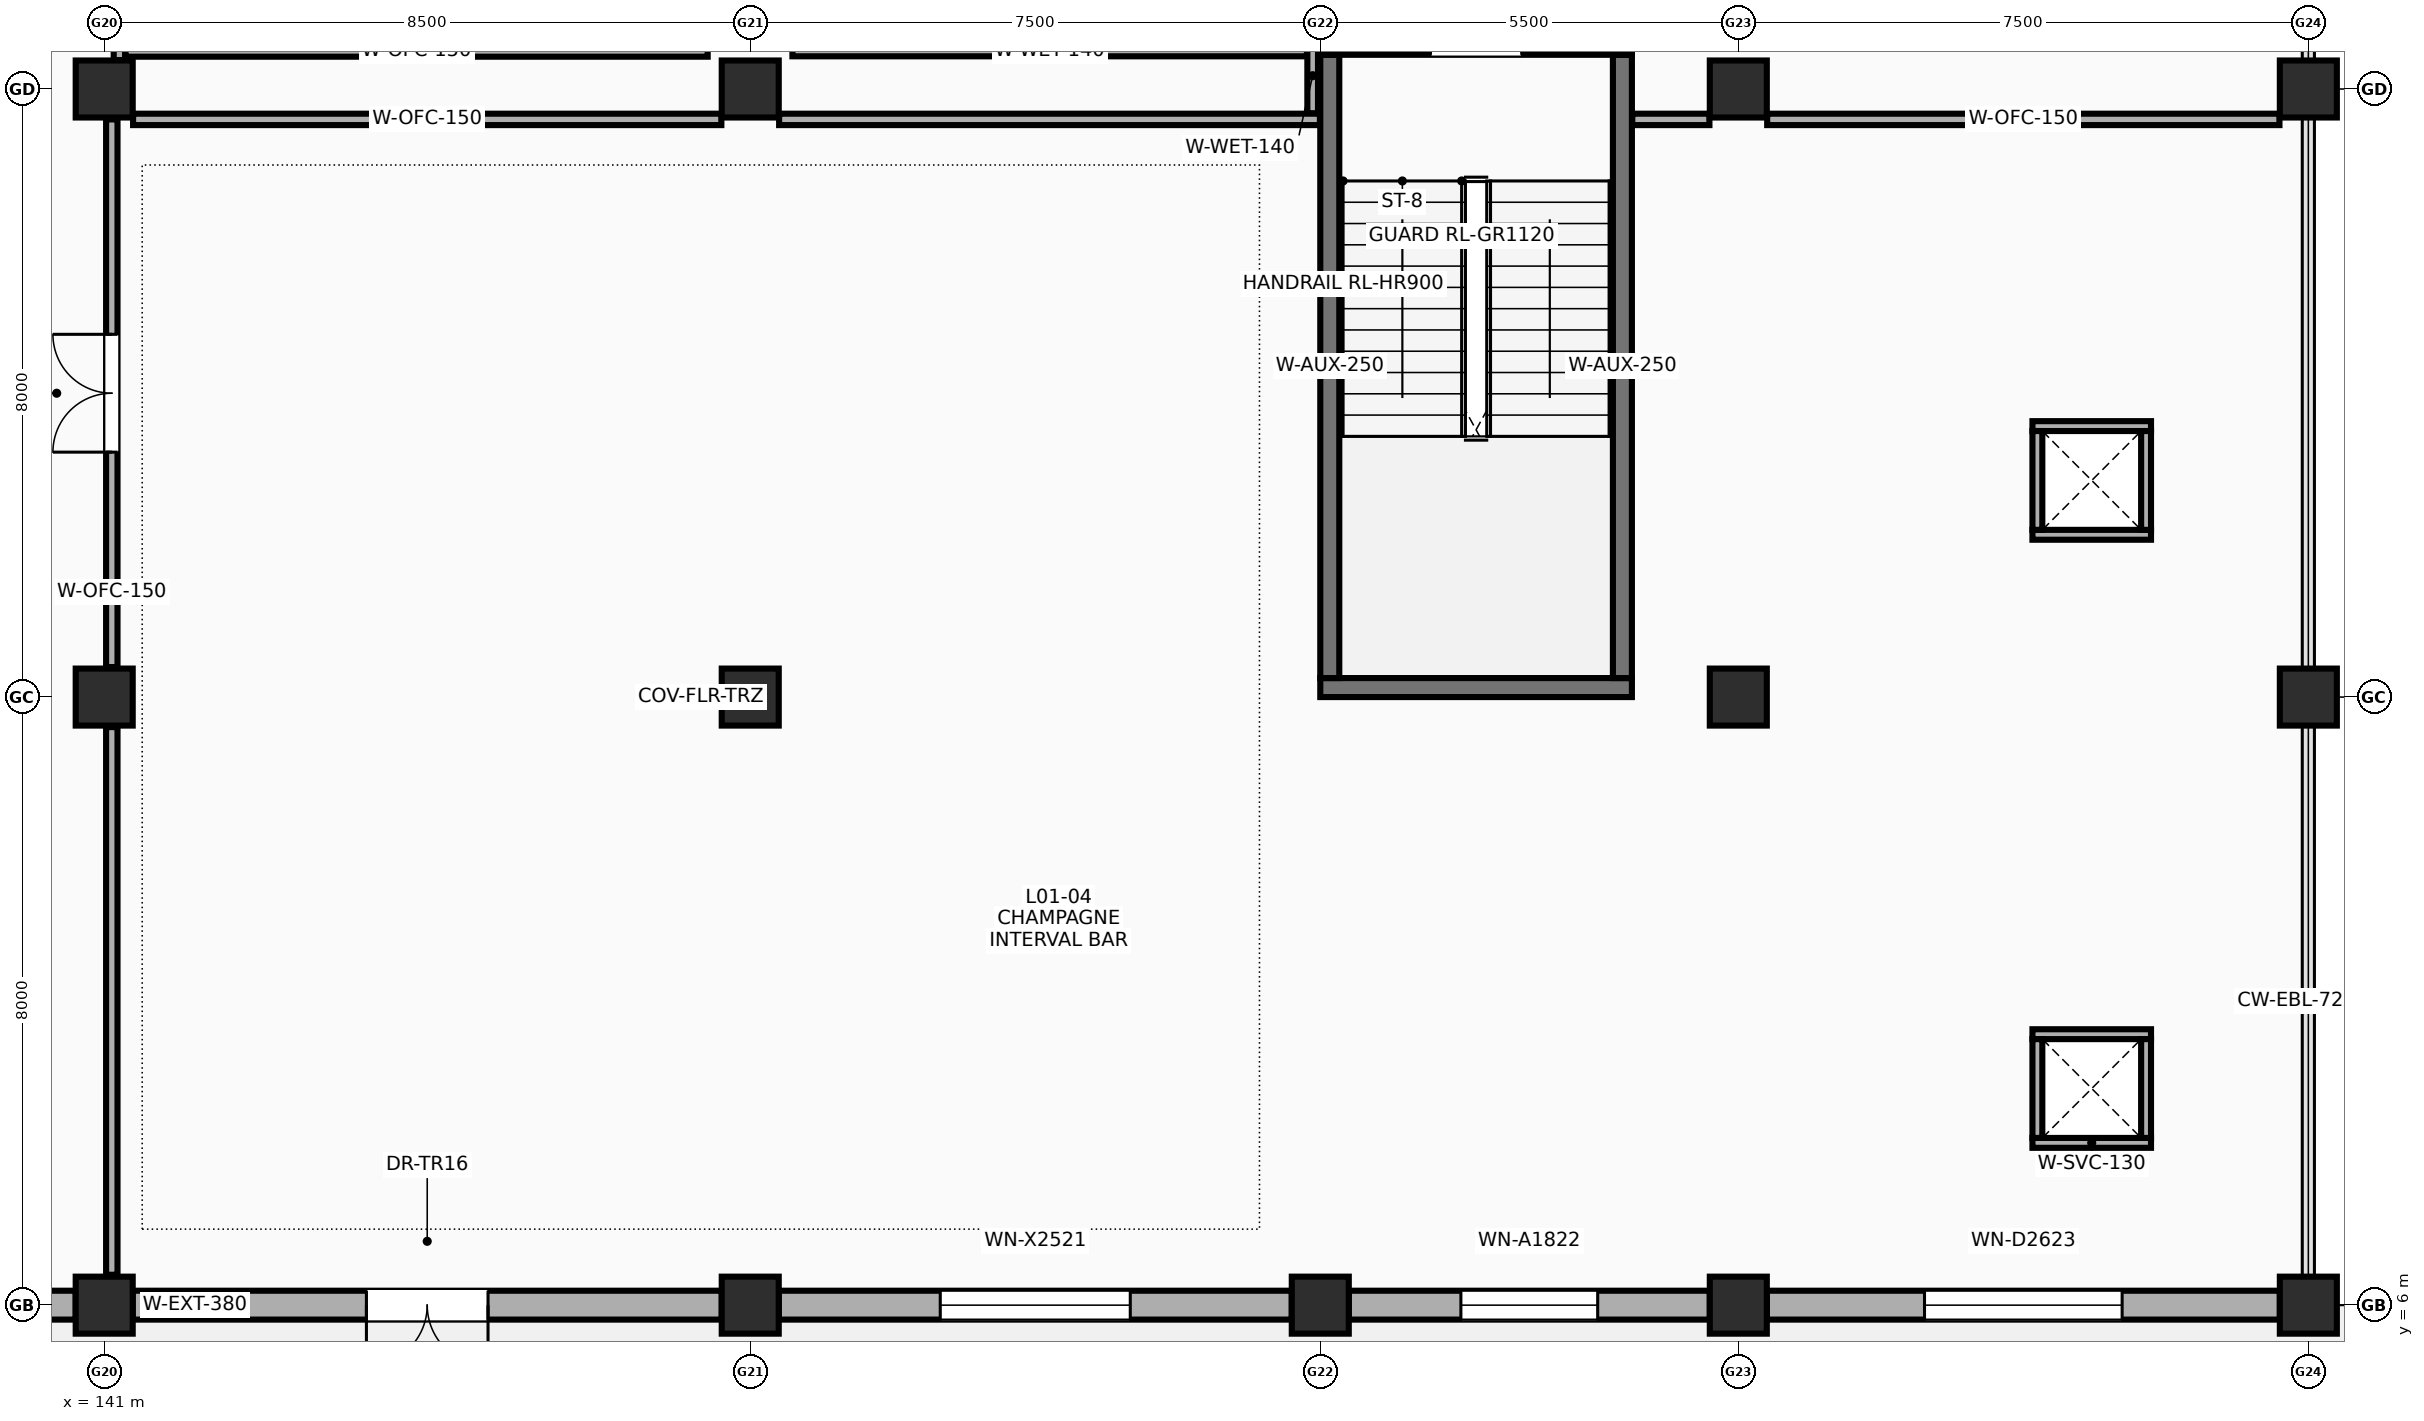
"""IFC4 building model, lengths in metres.
Left out: names, types, materials, properties, quantities, classifications, styles, units other than length and angle.
Written with IfcOpenShell. Run it as: python <this file> out.ifc"""

import sys

from ifc_helpers import new_model, si_unit, direction, frame, frame_2d, origin, origin_2d, place, context, subcontext, project, spatial, rectangle, extrude, element, fill, save


model = new_model("IFC4")
c1 = context("Model", 3, precision=1e-05, world=origin(), true_north=direction((0.0, 1.0)))
c2 = subcontext(c1, "Body", "Model", "MODEL_VIEW")
j1 = project(units=[si_unit("LENGTHUNIT", "METRE"), si_unit("PLANEANGLEUNIT", "RADIAN")], contexts=[c1])
p1 = place(None, origin())
s1 = spatial("IfcSite", under=j1, at=p1, CompositionType="ELEMENT")
p2 = place(p1, origin())
s2 = spatial("IfcBuilding", under=s1, at=p2, CompositionType="ELEMENT")
p3 = place(p2, frame((0.0, 0.0, 5.4)))
s3 = spatial("IfcBuildingStorey", under=s2, at=p3, CompositionType="ELEMENT", Elevation=5.4)
for number, where, z_axis, x_axis in (
    (1, (141.0, 6.0, 0.0), (0.0, 0.0, 1.0), (1.0, 0.0, 0.0)),
    (2, (141.0, 14.0, 0.0), (0.0, 0.0, 1.0), (1.0, 0.0, 0.0)),
    (3, (141.0, 22.0, 0.0), (0.0, 0.0, 1.0), (1.0, 0.0, 0.0)),
    (4, (149.5, 6.0, 0.0), (0.0, 0.0, 1.0), (1.0, 0.0, 0.0)),
    (5, (149.5, 14.0, 0.0), (0.0, 0.0, 1.0), (1.0, 0.0, 0.0)),
    (6, (149.5, 22.0, 0.0), (0.0, 0.0, 1.0), (1.0, 0.0, 0.0)),
    (7, (157.0, 6.0, 0.0), (0.0, 0.0, 1.0), (1.0, 0.0, 0.0)),
    (8, (162.5, 6.0, 0.0), (0.0, 0.0, 1.0), (1.0, 0.0, 0.0)),
    (9, (162.5, 14.0, 0.0), (0.0, 0.0, 1.0), (1.0, 0.0, 0.0)),
    (10, (162.5, 22.0, 0.0), (0.0, 0.0, 1.0), (1.0, 0.0, 0.0)),
    (11, (170.0, 6.0, 0.0), (0.0, 0.0, 1.0), (1.0, 0.0, 0.0)),
    (12, (170.0, 14.0, 0.0), (0.0, 0.0, 1.0), (1.0, 0.0, 0.0)),
    (13, (170.0, 22.0, 0.0), (0.0, 0.0, 1.0), (1.0, 0.0, 0.0)),
):
    element("IfcColumn", number, at=place(p3, frame(where, z_axis=z_axis, x_axis=x_axis)), inside=s3, PredefinedType="COLUMN", context=c2, shape_type="SweptSolid", body=[
        extrude(rectangle(XDim=0.75, YDim=0.75, at=origin_2d()), origin(), (0.0, 0.0, 1.0), 4.4),
    ])
p4 = place(p3, frame((133.375, 6.0, 0.0), z_axis=(0.0, 0.0, 1.0), x_axis=(1.0, 0.0, 0.0)))
e14 = element("IfcWall", 14, at=p4, inside=s3, PredefinedType="SOLIDWALL", context=c2, shape_type="SweptSolid", body=[
    extrude(rectangle(XDim=7.25, YDim=0.38, at=frame_2d((3.625, 0.0))), origin(), (0.0, 0.0, 1.0), 3.2),
])
p5 = place(p4, frame((2.425, 0.0, 0.85)))
e15 = element("IfcOpeningElement", 15, at=p5, cuts=e14, PredefinedType="OPENING", context=c2, shape_type="SweptSolid", body=[
    extrude(rectangle(XDim=2.5, YDim=2.1, at=frame_2d((1.25, 1.05))), frame((0.0, 0.2, 0.0), z_axis=(0.0, -1.0, 0.0), x_axis=(1.0, 0.0, 0.0)), (0.0, 0.0, 1.0), 0.4),
])
p6 = place(p3, frame((141.375, 6.0, 0.0), z_axis=(0.0, 0.0, 1.0), x_axis=(1.0, 0.0, 0.0)))
e16 = element("IfcWall", 16, at=p6, inside=s3, PredefinedType="SOLIDWALL", context=c2, shape_type="SweptSolid", body=[
    extrude(rectangle(XDim=7.75, YDim=0.38, at=frame_2d((3.875, 0.0))), origin(), (0.0, 0.0, 1.0), 3.2),
])
p7 = place(p6, frame((4.675, 0.0, 0.0), z_axis=(0.0, 0.0, 1.0), x_axis=(-1.0, 0.0, 0.0)))
e17 = element("IfcOpeningElement", 17, at=p7, cuts=e16, PredefinedType="OPENING", context=c2, shape_type="SweptSolid", body=[
    extrude(rectangle(XDim=1.6, YDim=2.3, at=frame_2d((0.8, 1.15))), frame((0.0, 0.2, 0.0), z_axis=(0.0, -1.0, 0.0), x_axis=(1.0, 0.0, 0.0)), (0.0, 0.0, 1.0), 0.4),
])
p8 = place(p3, frame((149.875, 6.0, 0.0), z_axis=(0.0, 0.0, 1.0), x_axis=(1.0, 0.0, 0.0)))
e18 = element("IfcWall", 18, at=p8, inside=s3, PredefinedType="SOLIDWALL", context=c2, shape_type="SweptSolid", body=[
    extrude(rectangle(XDim=6.75, YDim=0.38, at=frame_2d((3.375, 0.0))), origin(), (0.0, 0.0, 1.0), 3.2),
])
p9 = place(p8, frame((2.125, 0.0, 0.85)))
e19 = element("IfcOpeningElement", 19, at=p9, cuts=e18, PredefinedType="OPENING", context=c2, shape_type="SweptSolid", body=[
    extrude(rectangle(XDim=2.5, YDim=2.1, at=frame_2d((1.25, 1.05))), frame((0.0, 0.2, 0.0), z_axis=(0.0, -1.0, 0.0), x_axis=(1.0, 0.0, 0.0)), (0.0, 0.0, 1.0), 0.4),
])
p10 = place(p3, frame((157.375, 6.0, 0.0), z_axis=(0.0, 0.0, 1.0), x_axis=(1.0, 0.0, 0.0)))
e20 = element("IfcWall", 20, at=p10, inside=s3, PredefinedType="SOLIDWALL", context=c2, shape_type="SweptSolid", body=[
    extrude(rectangle(XDim=4.75, YDim=0.38, at=frame_2d((2.375, 0.0))), origin(), (0.0, 0.0, 1.0), 3.2),
])
p11 = place(p10, frame((1.475, 0.0, 0.82)))
e21 = element("IfcOpeningElement", 21, at=p11, cuts=e20, PredefinedType="OPENING", context=c2, shape_type="SweptSolid", body=[
    extrude(rectangle(XDim=1.8, YDim=2.2, at=frame_2d((0.9, 1.1))), frame((0.0, 0.2, 0.0), z_axis=(0.0, -1.0, 0.0), x_axis=(1.0, 0.0, 0.0)), (0.0, 0.0, 1.0), 0.4),
])
p12 = place(p3, frame((162.875, 6.0, 0.0), z_axis=(0.0, 0.0, 1.0), x_axis=(1.0, 0.0, 0.0)))
e22 = element("IfcWall", 22, at=p12, inside=s3, PredefinedType="SOLIDWALL", context=c2, shape_type="SweptSolid", body=[
    extrude(rectangle(XDim=6.75, YDim=0.38, at=frame_2d((3.375, 0.0))), origin(), (0.0, 0.0, 1.0), 3.2),
])
p13 = place(p12, frame((2.075, 0.0, 0.72)))
e23 = element("IfcOpeningElement", 23, at=p13, cuts=e22, PredefinedType="OPENING", context=c2, shape_type="SweptSolid", body=[
    extrude(rectangle(XDim=2.6, YDim=2.3, at=frame_2d((1.3, 1.15))), frame((0.0, 0.2, 0.0), z_axis=(0.0, -1.0, 0.0), x_axis=(1.0, 0.0, 0.0)), (0.0, 0.0, 1.0), 0.4),
])
p14 = place(p3, frame((157.0, 14.125, 0.0), z_axis=(0.0, 0.0, 1.0), x_axis=(1.0, 0.0, 0.0)))
e24 = element("IfcWall", 24, at=p14, inside=s3, PredefinedType="SHEAR", context=c2, shape_type="SweptSolid", body=[
    extrude(rectangle(XDim=4.1, YDim=0.25, at=frame_2d((2.05, 0.0))), origin(), (0.0, 0.0, 1.0), 4.4),
])
for number, where, z_axis, x_axis in (
    (25, (157.125, 14.25, 0.0), (0.0, 0.0, 1.0), (0.0, 1.0, 0.0)),
    (26, (160.975, 14.25, 0.0), (0.0, 0.0, 1.0), (0.0, 1.0, 0.0)),
):
    element("IfcWall", number, at=place(p3, frame(where, z_axis=z_axis, x_axis=x_axis)), inside=s3, PredefinedType="SHEAR", context=c2, shape_type="SweptSolid", body=[
        extrude(rectangle(XDim=8.2, YDim=0.25, at=frame_2d((4.1, 0.0))), origin(), (0.0, 0.0, 1.0), 4.4),
    ])
p15 = place(p3, frame((157.0, 22.575, 0.0), z_axis=(0.0, 0.0, 1.0), x_axis=(1.0, 0.0, 0.0)))
e27 = element("IfcWall", 27, at=p15, inside=s3, PredefinedType="SHEAR", context=c2, shape_type="SweptSolid", body=[
    extrude(rectangle(XDim=4.1, YDim=0.25, at=frame_2d((2.05, 0.0))), origin(), (0.0, 0.0, 1.0), 4.4),
])
p16 = place(p15, frame((1.45, 0.0, 0.0)))
e28 = element("IfcOpeningElement", 28, at=p16, cuts=e27, PredefinedType="OPENING", context=c2, shape_type="SweptSolid", body=[
    extrude(rectangle(XDim=1.2, YDim=2.15, at=frame_2d((0.6, 1.075))), frame((0.0, 0.135, 0.0), z_axis=(0.0, -1.0, 0.0), x_axis=(1.0, 0.0, 0.0)), (0.0, 0.0, 1.0), 0.27),
])
for number, where, z_axis, x_axis in (
    (29, (166.37, 8.135, 0.0), (0.0, 0.0, 1.0), (1.0, 0.0, 0.0)),
    (30, (166.37, 9.565, 0.0), (0.0, 0.0, 1.0), (1.0, 0.0, 0.0)),
):
    element("IfcWall", number, at=place(p3, frame(where, z_axis=z_axis, x_axis=x_axis)), inside=s3, PredefinedType="PARTITIONING", context=c2, shape_type="SweptSolid", body=[
        extrude(rectangle(XDim=1.56, YDim=0.13, at=frame_2d((0.78, 0.0))), origin(), (0.0, 0.0, 1.0), 4.02),
    ])
for number, where, z_axis, x_axis in (
    (31, (166.435, 8.2, 0.0), (0.0, 0.0, 1.0), (0.0, 1.0, 0.0)),
    (32, (167.865, 8.2, 0.0), (0.0, 0.0, 1.0), (0.0, 1.0, 0.0)),
):
    element("IfcWall", number, at=place(p3, frame(where, z_axis=z_axis, x_axis=x_axis)), inside=s3, PredefinedType="PARTITIONING", context=c2, shape_type="SweptSolid", body=[
        extrude(rectangle(XDim=1.3, YDim=0.13, at=frame_2d((0.65, 0.0))), origin(), (0.0, 0.0, 1.0), 4.02),
    ])
for number, where, z_axis, x_axis in (
    (33, (166.37, 16.135, 0.0), (0.0, 0.0, 1.0), (1.0, 0.0, 0.0)),
    (34, (166.37, 17.565, 0.0), (0.0, 0.0, 1.0), (1.0, 0.0, 0.0)),
):
    element("IfcWall", number, at=place(p3, frame(where, z_axis=z_axis, x_axis=x_axis)), inside=s3, PredefinedType="PARTITIONING", context=c2, shape_type="SweptSolid", body=[
        extrude(rectangle(XDim=1.56, YDim=0.13, at=frame_2d((0.78, 0.0))), origin(), (0.0, 0.0, 1.0), 4.02),
    ])
for number, where, z_axis, x_axis in (
    (35, (166.435, 16.2, 0.0), (0.0, 0.0, 1.0), (0.0, 1.0, 0.0)),
    (36, (167.865, 16.2, 0.0), (0.0, 0.0, 1.0), (0.0, 1.0, 0.0)),
):
    element("IfcWall", number, at=place(p3, frame(where, z_axis=z_axis, x_axis=x_axis)), inside=s3, PredefinedType="PARTITIONING", context=c2, shape_type="SweptSolid", body=[
        extrude(rectangle(XDim=1.3, YDim=0.13, at=frame_2d((0.65, 0.0))), origin(), (0.0, 0.0, 1.0), 4.02),
    ])
p17 = place(p3, frame((141.1, 14.395, 0.0), z_axis=(0.0, 0.0, 1.0), x_axis=(0.0, 1.0, 0.0)))
e37 = element("IfcWall", 37, at=p17, inside=s3, PredefinedType="PARTITIONING", context=c2, shape_type="SweptSolid", body=[
    extrude(rectangle(XDim=7.205, YDim=0.15, at=frame_2d((3.603, 0.0))), origin(), (0.0, 0.0, 1.0), 3.3),
])
p18 = place(p17, frame((2.827, 0.0, 0.0)))
e38 = element("IfcOpeningElement", 38, at=p18, cuts=e37, PredefinedType="OPENING", context=c2, shape_type="SweptSolid", body=[
    extrude(rectangle(XDim=1.55, YDim=2.25, at=frame_2d((0.775, 1.125))), frame((0.0, 0.085, 0.0), z_axis=(0.0, -1.0, 0.0), x_axis=(1.0, 0.0, 0.0)), (0.0, 0.0, 1.0), 0.17),
])
p19 = place(p3, frame((141.1, 6.4, 0.0), z_axis=(0.0, 0.0, 1.0), x_axis=(0.0, 1.0, 0.0)))
e39 = element("IfcWall", 39, at=p19, inside=s3, PredefinedType="PARTITIONING", context=c2, shape_type="SweptSolid", body=[
    extrude(rectangle(XDim=7.205, YDim=0.15, at=frame_2d((3.603, 0.0))), origin(), (0.0, 0.0, 1.0), 3.33),
])
p20 = place(p3, frame((141.2, 22.38, 0.0), z_axis=(0.0, 0.0, 1.0), x_axis=(0.0, 1.0, 0.0)))
e40 = element("IfcWall", 40, at=p20, inside=s3, PredefinedType="PARTITIONING", context=c2, shape_type="SweptSolid", body=[
    extrude(rectangle(XDim=3.82, YDim=0.15, at=frame_2d((1.91, 0.0))), origin(), (0.0, 0.0, 1.0), 3.5),
])
p21 = place(p20, frame((1.17, 0.0, 0.0)))
e41 = element("IfcOpeningElement", 41, at=p21, cuts=e40, PredefinedType="OPENING", context=c2, shape_type="SweptSolid", body=[
    extrude(rectangle(XDim=1.6, YDim=2.25, at=frame_2d((0.8, 1.125))), frame((0.0, 0.085, 0.0), z_axis=(0.0, -1.0, 0.0), x_axis=(1.0, 0.0, 0.0)), (0.0, 0.0, 1.0), 0.17),
])
p22 = place(p3, frame((156.9, 21.68, 0.0), z_axis=(0.0, 0.0, 1.0), x_axis=(0.0, 1.0, 0.0)))
e42 = element("IfcWall", 42, at=p22, inside=s3, PredefinedType="PARTITIONING", context=c2, shape_type="SweptSolid", body=[
    extrude(rectangle(XDim=4.52, YDim=0.14, at=frame_2d((2.26, 0.0))), origin(), (0.0, 0.0, 1.0), 3.5),
])
p23 = place(p22, frame((1.87, 0.0, 0.0)))
e43 = element("IfcOpeningElement", 43, at=p23, cuts=e42, PredefinedType="OPENING", context=c2, shape_type="SweptSolid", body=[
    extrude(rectangle(XDim=1.6, YDim=2.25, at=frame_2d((0.8, 1.125))), frame((0.0, 0.08, 0.0), z_axis=(0.0, -1.0, 0.0), x_axis=(1.0, 0.0, 0.0)), (0.0, 0.0, 1.0), 0.16),
])
p24 = place(p3, frame((141.38, 21.6, 0.0), z_axis=(0.0, 0.0, 1.0), x_axis=(1.0, 0.0, 0.0)))
e44 = element("IfcWall", 44, at=p24, inside=s3, PredefinedType="PARTITIONING", context=c2, shape_type="SweptSolid", body=[
    extrude(rectangle(XDim=7.74, YDim=0.15, at=frame_2d((3.87, 0.0))), origin(), (0.0, 0.0, 1.0), 4.02),
])
p25 = place(p3, frame((149.88, 21.6, 0.0), z_axis=(0.0, 0.0, 1.0), x_axis=(1.0, 0.0, 0.0)))
e45 = element("IfcWall", 45, at=p25, inside=s3, PredefinedType="PARTITIONING", context=c2, shape_type="SweptSolid", body=[
    extrude(rectangle(XDim=7.115, YDim=0.15, at=frame_2d((3.558, 0.0))), origin(), (0.0, 0.0, 1.0), 3.5),
])
p26 = place(p3, frame((161.105, 21.6, 0.0), z_axis=(0.0, 0.0, 1.0), x_axis=(1.0, 0.0, 0.0)))
e46 = element("IfcWall", 46, at=p26, inside=s3, PredefinedType="PARTITIONING", context=c2, shape_type="SweptSolid", body=[
    extrude(rectangle(XDim=1.015, YDim=0.15, at=frame_2d((0.508, 0.0))), origin(), (0.0, 0.0, 1.0), 4.02),
])
p27 = place(p3, frame((162.88, 21.6, 0.0), z_axis=(0.0, 0.0, 1.0), x_axis=(1.0, 0.0, 0.0)))
e47 = element("IfcWall", 47, at=p27, inside=s3, PredefinedType="PARTITIONING", context=c2, shape_type="SweptSolid", body=[
    extrude(rectangle(XDim=6.74, YDim=0.15, at=frame_2d((3.37, 0.0))), origin(), (0.0, 0.0, 1.0), 4.02),
])
p28 = place(p3, frame((141.28, 22.5, 0.0), z_axis=(0.0, 0.0, 1.0), x_axis=(1.0, 0.0, 0.0)))
e48 = element("IfcWall", 48, at=p28, inside=s3, PredefinedType="PARTITIONING", context=c2, shape_type="SweptSolid", body=[
    extrude(rectangle(XDim=7.66, YDim=0.15, at=frame_2d((3.83, 0.0))), origin(), (0.0, 0.0, 1.0), 3.5),
])
p29 = place(p3, frame((150.055, 22.5, 0.0), z_axis=(0.0, 0.0, 1.0), x_axis=(1.0, 0.0, 0.0)))
e49 = element("IfcWall", 49, at=p29, inside=s3, PredefinedType="PARTITIONING", context=c2, shape_type="SweptSolid", body=[
    extrude(rectangle(XDim=6.77, YDim=0.14, at=frame_2d((3.385, 0.0))), origin(), (0.0, 0.0, 1.0), 3.5),
])
p30 = place(p7, origin())
e50 = element("IfcDoor", 50, at=p30, inside=s3, OperationType="DOUBLE_DOOR_SINGLE_SWING", PredefinedType="DOOR", context=c2, shape_type="SweptSolid", body=[
    extrude(rectangle(XDim=1.6, YDim=2.3, at=frame_2d((0.8, 1.15))), frame((0.0, 0.025, 0.0), z_axis=(0.0, -1.0, 0.0), x_axis=(1.0, 0.0, 0.0)), (0.0, 0.0, 1.0), 0.05),
])
fill(e17, e50)
p31 = place(p9, origin())
e51 = element("IfcWindow", 51, at=p31, inside=s3, PartitioningType="SINGLE_PANEL", PredefinedType="WINDOW", context=c2, shape_type="SweptSolid", body=[
    extrude(rectangle(XDim=2.5, YDim=2.1, at=frame_2d((1.25, 1.05))), frame((0.0, 0.03, 0.0), z_axis=(0.0, -1.0, 0.0), x_axis=(1.0, 0.0, 0.0)), (0.0, 0.0, 1.0), 0.06),
])
fill(e19, e51)
p32 = place(p11, origin())
e52 = element("IfcWindow", 52, at=p32, inside=s3, PartitioningType="SINGLE_PANEL", PredefinedType="WINDOW", context=c2, shape_type="SweptSolid", body=[
    extrude(rectangle(XDim=1.8, YDim=2.2, at=frame_2d((0.9, 1.1))), frame((0.0, 0.03, 0.0), z_axis=(0.0, -1.0, 0.0), x_axis=(1.0, 0.0, 0.0)), (0.0, 0.0, 1.0), 0.06),
])
fill(e21, e52)
p33 = place(p13, origin())
e53 = element("IfcWindow", 53, at=p33, inside=s3, PartitioningType="SINGLE_PANEL", PredefinedType="WINDOW", context=c2, shape_type="SweptSolid", body=[
    extrude(rectangle(XDim=2.6, YDim=2.3, at=frame_2d((1.3, 1.15))), frame((0.0, 0.03, 0.0), z_axis=(0.0, -1.0, 0.0), x_axis=(1.0, 0.0, 0.0)), (0.0, 0.0, 1.0), 0.06),
])
fill(e23, e53)
p34 = place(p18, origin())
e54 = element("IfcDoor", 54, at=p34, inside=s3, OperationType="DOUBLE_DOOR_SINGLE_SWING", PredefinedType="DOOR", context=c2, shape_type="SweptSolid", body=[
    extrude(rectangle(XDim=1.55, YDim=2.25, at=frame_2d((0.775, 1.125))), frame((0.0, 0.025, 0.0), z_axis=(0.0, -1.0, 0.0), x_axis=(1.0, 0.0, 0.0)), (0.0, 0.0, 1.0), 0.05),
])
fill(e38, e54)
save(model, sys.argv[1])
